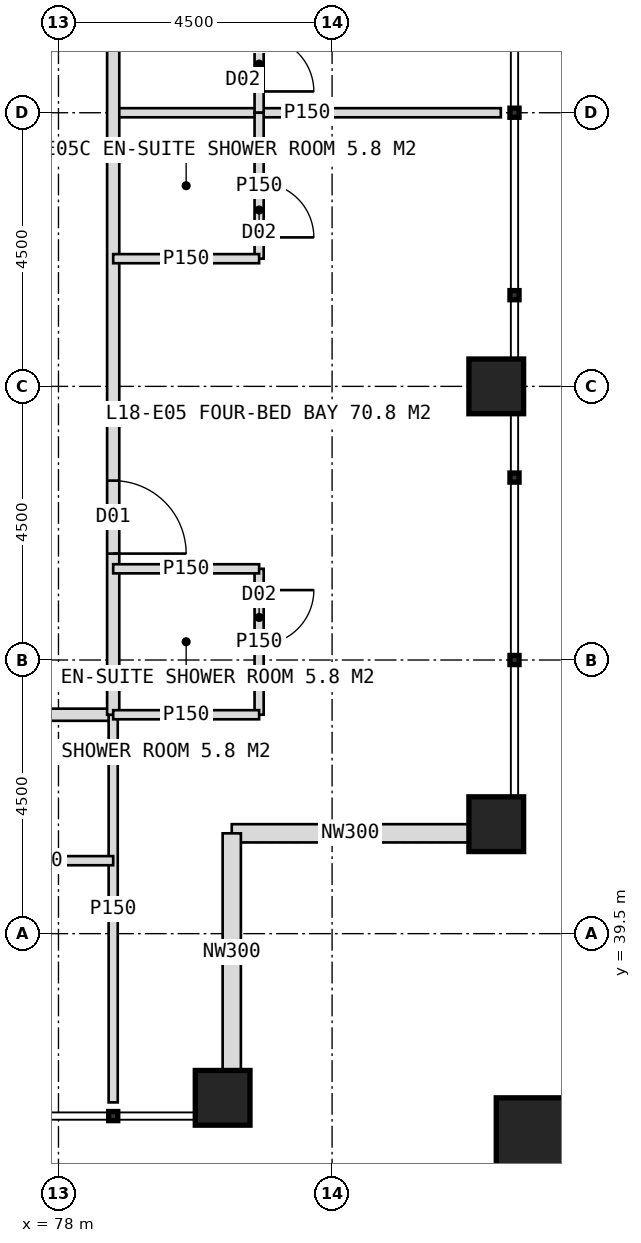
"""IFC4 building model, lengths in metres.
Left out: names, types, materials, properties, quantities, classifications, styles, units other than length and angle.
Written with IfcOpenShell. Run it as: python <this file> out.ifc"""

import sys

from ifc_helpers import new_model, si_unit, direction, frame, frame_2d, origin, origin_2d, place, context, subcontext, project, spatial, rectangle, hollow_rectangle, extrude, element, fill, save


model = new_model("IFC4")
c1 = context("Model", 3, precision=1e-05, world=origin(), true_north=direction((0.0, 1.0)))
c2 = subcontext(c1, "Body", "Model", "MODEL_VIEW")
j1 = project(units=[si_unit("LENGTHUNIT", "METRE"), si_unit("PLANEANGLEUNIT", "RADIAN")], contexts=[c1])
p1 = place(None, origin())
s1 = spatial("IfcSite", under=j1, at=p1, CompositionType="ELEMENT")
p2 = place(p1, origin())
s2 = spatial("IfcBuilding", under=s1, at=p2, CompositionType="ELEMENT")
p3 = place(p2, frame((0.0, 0.0, 79.0)))
s3 = spatial("IfcBuildingStorey", under=s2, at=p3, CompositionType="ELEMENT", Elevation=79.0)
for number, where, z_axis, x_axis in (
    (1, (85.2, 41.3, 0.0), (0.0, 0.0, 1.0), (1.0, 0.0, 0.0)),
    (2, (85.2, 48.5, 0.0), (0.0, 0.0, 1.0), (1.0, 0.0, 0.0)),
    (3, (80.7, 36.8, 0.0), (0.0, 0.0, 1.0), (1.0, 0.0, 0.0)),
):
    element("IfcColumn", number, at=place(p3, frame(where, z_axis=z_axis, x_axis=x_axis)), inside=s3, PredefinedType="COLUMN", context=c2, shape_type="SweptSolid", body=[
        extrude(hollow_rectangle(XDim=0.9, YDim=0.9, WallThickness=0.08, at=origin_2d()), origin(), (0.0, 0.0, 1.0), 4.0),
    ])
p4 = place(p3, frame((86.1, 35.9, 0.0), z_axis=(0.0, 0.0, 1.0), x_axis=(1.0, 0.0, 0.0)))
e4 = element("IfcColumn", 4, at=p4, inside=s3, PredefinedType="COLUMN", context=c2, shape_type="SweptSolid", body=[
    extrude(hollow_rectangle(XDim=1.8, YDim=1.8, WallThickness=0.1, at=origin_2d()), origin(), (0.0, 0.0, 1.0), 4.0),
])
for number, where, z_axis, x_axis in (
    (5, (84.75, 41.15, 0.0), (0.0, 0.0, 1.0), (-1.0, 0.0, 0.0)),
    (6, (80.85, 41.15, 0.0), (0.0, 0.0, 1.0), (0.0, -1.0, 0.0)),
):
    element("IfcWall", number, at=place(p3, frame(where, z_axis=z_axis, x_axis=x_axis)), inside=s3, PredefinedType="ELEMENTEDWALL", context=c2, shape_type="SweptSolid", body=[
        extrude(rectangle(XDim=3.9, YDim=0.3, at=frame_2d((1.95, 0.0))), origin(), (0.0, 0.0, 1.0), 2.95),
    ])
p5 = place(p3, frame((78.9, 43.1, 0.0), z_axis=(0.0, 0.0, 1.0), x_axis=(-1.0, 0.0, 0.0)))
e7 = element("IfcWall", 7, at=p5, inside=s3, PredefinedType="PARTITIONING", context=c2, shape_type="SweptSolid", body=[
    extrude(rectangle(XDim=37.8, YDim=0.2, at=frame_2d((18.9, 0.0))), origin(), (0.0, 0.0, 1.0), 3.75),
])
p6 = place(p5, frame((6.05, 0.0, 0.0)))
e8 = element("IfcOpeningElement", 8, at=p6, cuts=e7, PredefinedType="OPENING", context=c2, shape_type="SweptSolid", body=[
    extrude(rectangle(XDim=1.2, YDim=2.2, at=frame_2d((0.6, 1.1))), frame((0.0, 0.11, 0.0), z_axis=(0.0, -1.0, 0.0), x_axis=(1.0, 0.0, 0.0)), (0.0, 0.0, 1.0), 0.22),
])
p7 = place(p5, frame((12.55, 0.0, 0.0)))
e9 = element("IfcOpeningElement", 9, at=p7, cuts=e7, PredefinedType="OPENING", context=c2, shape_type="SweptSolid", body=[
    extrude(rectangle(XDim=1.2, YDim=2.2, at=frame_2d((0.6, 1.1))), frame((0.0, 0.11, 0.0), z_axis=(0.0, -1.0, 0.0), x_axis=(1.0, 0.0, 0.0)), (0.0, 0.0, 1.0), 0.22),
])
p8 = place(p5, frame((21.05, 0.0, 0.0)))
e10 = element("IfcOpeningElement", 10, at=p8, cuts=e7, PredefinedType="OPENING", context=c2, shape_type="SweptSolid", body=[
    extrude(rectangle(XDim=1.2, YDim=2.2, at=frame_2d((0.6, 1.1))), frame((0.0, 0.11, 0.0), z_axis=(0.0, -1.0, 0.0), x_axis=(1.0, 0.0, 0.0)), (0.0, 0.0, 1.0), 0.22),
])
p9 = place(p5, frame((27.55, 0.0, 0.0)))
e11 = element("IfcOpeningElement", 11, at=p9, cuts=e7, PredefinedType="OPENING", context=c2, shape_type="SweptSolid", body=[
    extrude(rectangle(XDim=1.2, YDim=2.2, at=frame_2d((0.6, 1.1))), frame((0.0, 0.11, 0.0), z_axis=(0.0, -1.0, 0.0), x_axis=(1.0, 0.0, 0.0)), (0.0, 0.0, 1.0), 0.22),
])
p10 = place(p3, frame((78.9, 43.1, 0.0), z_axis=(0.0, 0.0, 1.0), x_axis=(0.0, -1.0, 0.0)))
e12 = element("IfcWall", 12, at=p10, inside=s3, PredefinedType="PARTITIONING", context=c2, shape_type="SweptSolid", body=[
    extrude(rectangle(XDim=6.375, YDim=0.15, at=frame_2d((3.188, 0.0))), origin(), (0.0, 0.0, 1.0), 3.75),
])
p11 = place(p3, frame((78.9, 40.7, 0.0), z_axis=(0.0, 0.0, 1.0), x_axis=(-1.0, 0.0, 0.0)))
e13 = element("IfcWall", 13, at=p11, inside=s3, PredefinedType="PARTITIONING", context=c2, shape_type="SweptSolid", body=[
    extrude(rectangle(XDim=2.4, YDim=0.15, at=frame_2d((1.2, 0.0))), origin(), (0.0, 0.0, 1.0), 3.75),
])
p12 = place(p11, frame((1.15, 0.0, 0.0)))
e14 = element("IfcOpeningElement", 14, at=p12, cuts=e13, PredefinedType="OPENING", context=c2, shape_type="SweptSolid", body=[
    extrude(rectangle(XDim=0.9, YDim=2.1, at=frame_2d((0.45, 1.05))), frame((0.0, 0.085, 0.0), z_axis=(0.0, -1.0, 0.0), x_axis=(1.0, 0.0, 0.0)), (0.0, 0.0, 1.0), 0.17),
])
p13 = place(p3, frame((78.9, 53.0, 0.0), z_axis=(0.0, 0.0, 1.0), x_axis=(1.0, 0.0, 0.0)))
e15 = element("IfcWall", 15, at=p13, inside=s3, PredefinedType="PARTITIONING", context=c2, shape_type="SweptSolid", body=[
    extrude(rectangle(XDim=6.375, YDim=0.15, at=frame_2d((3.188, 0.0))), origin(), (0.0, 0.0, 1.0), 3.75),
])
p14 = place(p3, frame((78.9, 80.9, 0.0), z_axis=(0.0, 0.0, 1.0), x_axis=(0.0, -1.0, 0.0)))
e16 = element("IfcWall", 16, at=p14, inside=s3, PredefinedType="PARTITIONING", context=c2, shape_type="SweptSolid", body=[
    extrude(rectangle(XDim=37.8, YDim=0.2, at=frame_2d((18.9, 0.0))), origin(), (0.0, 0.0, 1.0), 3.75),
])
p15 = place(p14, frame((2.45, 0.0, 0.0)))
e17 = element("IfcOpeningElement", 17, at=p15, cuts=e16, PredefinedType="OPENING", context=c2, shape_type="SweptSolid", body=[
    extrude(rectangle(XDim=1.2, YDim=2.2, at=frame_2d((0.6, 1.1))), frame((0.0, 0.11, 0.0), z_axis=(0.0, -1.0, 0.0), x_axis=(1.0, 0.0, 0.0)), (0.0, 0.0, 1.0), 0.22),
])
p16 = place(p14, frame((9.55, 0.0, 0.0)))
e18 = element("IfcOpeningElement", 18, at=p16, cuts=e16, PredefinedType="OPENING", context=c2, shape_type="SweptSolid", body=[
    extrude(rectangle(XDim=1.2, YDim=2.2, at=frame_2d((0.6, 1.1))), frame((0.0, 0.11, 0.0), z_axis=(0.0, -1.0, 0.0), x_axis=(1.0, 0.0, 0.0)), (0.0, 0.0, 1.0), 0.22),
])
p17 = place(p14, frame((15.05, 0.0, 0.0)))
e19 = element("IfcOpeningElement", 19, at=p17, cuts=e16, PredefinedType="OPENING", context=c2, shape_type="SweptSolid", body=[
    extrude(rectangle(XDim=1.2, YDim=2.2, at=frame_2d((0.6, 1.1))), frame((0.0, 0.11, 0.0), z_axis=(0.0, -1.0, 0.0), x_axis=(1.0, 0.0, 0.0)), (0.0, 0.0, 1.0), 0.22),
])
p18 = place(p14, frame((21.55, 0.0, 0.0)))
e20 = element("IfcOpeningElement", 20, at=p18, cuts=e16, PredefinedType="OPENING", context=c2, shape_type="SweptSolid", body=[
    extrude(rectangle(XDim=1.2, YDim=2.2, at=frame_2d((0.6, 1.1))), frame((0.0, 0.11, 0.0), z_axis=(0.0, -1.0, 0.0), x_axis=(1.0, 0.0, 0.0)), (0.0, 0.0, 1.0), 0.22),
])
p19 = place(p14, frame((33.95, 0.0, 0.0)))
e21 = element("IfcOpeningElement", 21, at=p19, cuts=e16, PredefinedType="OPENING", context=c2, shape_type="SweptSolid", body=[
    extrude(rectangle(XDim=1.2, YDim=2.2, at=frame_2d((0.6, 1.1))), frame((0.0, 0.11, 0.0), z_axis=(0.0, -1.0, 0.0), x_axis=(1.0, 0.0, 0.0)), (0.0, 0.0, 1.0), 0.22),
])
p20 = place(p3, frame((81.3, 55.4, 0.0), z_axis=(0.0, 0.0, 1.0), x_axis=(0.0, -1.0, 0.0)))
e22 = element("IfcWall", 22, at=p20, inside=s3, PredefinedType="PARTITIONING", context=c2, shape_type="SweptSolid", body=[
    extrude(rectangle(XDim=2.4, YDim=0.15, at=frame_2d((1.2, 0.0))), origin(), (0.0, 0.0, 1.0), 3.75),
])
p21 = place(p20, frame((1.15, 0.0, 0.0)))
e23 = element("IfcOpeningElement", 23, at=p21, cuts=e22, PredefinedType="OPENING", context=c2, shape_type="SweptSolid", body=[
    extrude(rectangle(XDim=0.9, YDim=2.1, at=frame_2d((0.45, 1.05))), frame((0.0, 0.085, 0.0), z_axis=(0.0, -1.0, 0.0), x_axis=(1.0, 0.0, 0.0)), (0.0, 0.0, 1.0), 0.17),
])
p22 = place(p3, frame((81.3, 45.5, 0.0), z_axis=(0.0, 0.0, 1.0), x_axis=(0.0, -1.0, 0.0)))
e24 = element("IfcWall", 24, at=p22, inside=s3, PredefinedType="PARTITIONING", context=c2, shape_type="SweptSolid", body=[
    extrude(rectangle(XDim=2.4, YDim=0.15, at=frame_2d((1.2, 0.0))), origin(), (0.0, 0.0, 1.0), 3.75),
])
p23 = place(p22, frame((0.35, 0.0, 0.0)))
e25 = element("IfcOpeningElement", 25, at=p23, cuts=e24, PredefinedType="OPENING", context=c2, shape_type="SweptSolid", body=[
    extrude(rectangle(XDim=0.9, YDim=2.1, at=frame_2d((0.45, 1.05))), frame((0.0, 0.085, 0.0), z_axis=(0.0, -1.0, 0.0), x_axis=(1.0, 0.0, 0.0)), (0.0, 0.0, 1.0), 0.17),
])
p24 = place(p3, frame((78.9, 45.5, 0.0), z_axis=(0.0, 0.0, 1.0), x_axis=(1.0, 0.0, 0.0)))
e26 = element("IfcWall", 26, at=p24, inside=s3, PredefinedType="PARTITIONING", context=c2, shape_type="SweptSolid", body=[
    extrude(rectangle(XDim=2.4, YDim=0.15, at=frame_2d((1.2, 0.0))), origin(), (0.0, 0.0, 1.0), 3.75),
])
p25 = place(p3, frame((81.3, 53.0, 0.0), z_axis=(0.0, 0.0, 1.0), x_axis=(0.0, -1.0, 0.0)))
e27 = element("IfcWall", 27, at=p25, inside=s3, PredefinedType="PARTITIONING", context=c2, shape_type="SweptSolid", body=[
    extrude(rectangle(XDim=2.4, YDim=0.15, at=frame_2d((1.2, 0.0))), origin(), (0.0, 0.0, 1.0), 3.75),
])
p26 = place(p25, frame((1.15, 0.0, 0.0)))
e28 = element("IfcOpeningElement", 28, at=p26, cuts=e27, PredefinedType="OPENING", context=c2, shape_type="SweptSolid", body=[
    extrude(rectangle(XDim=0.9, YDim=2.1, at=frame_2d((0.45, 1.05))), frame((0.0, 0.085, 0.0), z_axis=(0.0, -1.0, 0.0), x_axis=(1.0, 0.0, 0.0)), (0.0, 0.0, 1.0), 0.17),
])
for number, where, z_axis, x_axis in (
    (29, (78.9, 50.6, 0.0), (0.0, 0.0, 1.0), (1.0, 0.0, 0.0)),
    (30, (78.9, 43.1, 0.0), (0.0, 0.0, 1.0), (1.0, 0.0, 0.0)),
):
    element("IfcWall", number, at=place(p3, frame(where, z_axis=z_axis, x_axis=x_axis)), inside=s3, PredefinedType="PARTITIONING", context=c2, shape_type="SweptSolid", body=[
        extrude(rectangle(XDim=2.4, YDim=0.15, at=frame_2d((1.2, 0.0))), origin(), (0.0, 0.0, 1.0), 3.75),
    ])
p27 = place(p21, origin())
e31 = element("IfcDoor", 31, at=p27, inside=s3, OperationType="SINGLE_SWING_RIGHT", PredefinedType="DOOR", context=c2, shape_type="SweptSolid", body=[
    extrude(rectangle(XDim=0.9, YDim=2.1, at=frame_2d((0.45, 1.05))), frame((0.0, 0.025, 0.0), z_axis=(0.0, -1.0, 0.0), x_axis=(1.0, 0.0, 0.0)), (0.0, 0.0, 1.0), 0.05),
])
fill(e23, e31)
p28 = place(p19, origin())
e32 = element("IfcDoor", 32, at=p28, inside=s3, OperationType="SINGLE_SWING_RIGHT", PredefinedType="DOOR", context=c2, shape_type="SweptSolid", body=[
    extrude(rectangle(XDim=1.2, YDim=2.2, at=frame_2d((0.6, 1.1))), frame((0.0, 0.025, 0.0), z_axis=(0.0, -1.0, 0.0), x_axis=(1.0, 0.0, 0.0)), (0.0, 0.0, 1.0), 0.05),
])
fill(e21, e32)
p29 = place(p23, origin())
e33 = element("IfcDoor", 33, at=p29, inside=s3, OperationType="SINGLE_SWING_LEFT", PredefinedType="DOOR", context=c2, shape_type="SweptSolid", body=[
    extrude(rectangle(XDim=0.9, YDim=2.1, at=frame_2d((0.45, 1.05))), frame((0.0, 0.025, 0.0), z_axis=(0.0, -1.0, 0.0), x_axis=(1.0, 0.0, 0.0)), (0.0, 0.0, 1.0), 0.05),
])
fill(e25, e33)
p30 = place(p26, origin())
e34 = element("IfcDoor", 34, at=p30, inside=s3, OperationType="SINGLE_SWING_RIGHT", PredefinedType="DOOR", context=c2, shape_type="SweptSolid", body=[
    extrude(rectangle(XDim=0.9, YDim=2.1, at=frame_2d((0.45, 1.05))), frame((0.0, 0.025, 0.0), z_axis=(0.0, -1.0, 0.0), x_axis=(1.0, 0.0, 0.0)), (0.0, 0.0, 1.0), 0.05),
])
fill(e28, e34)
save(model, sys.argv[1])
